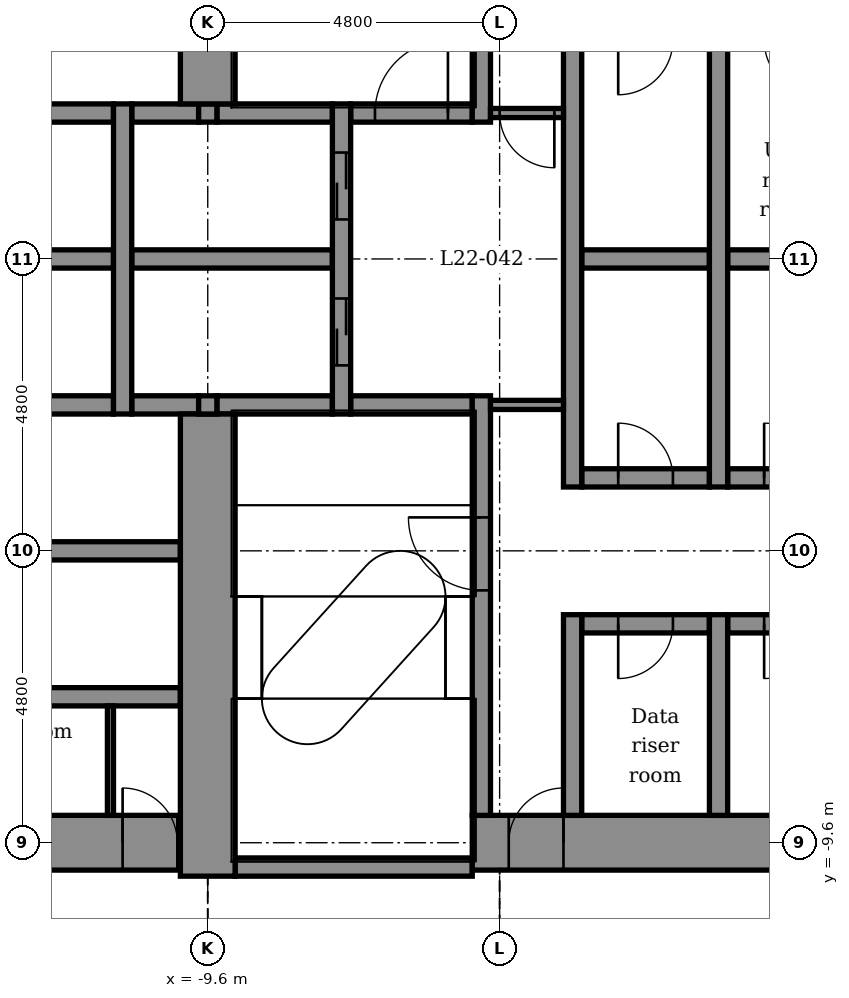
"""IFC4 building model, lengths in metres.
Left out: names, types, materials, properties, quantities, classifications, styles, units other than length and angle.
Written with IfcOpenShell. Run it as: python <this file> out.ifc"""

import sys

from ifc_helpers import new_model, si_unit, direction, frame, frame_2d, origin, place, context, subcontext, project, spatial, rectangle, extrude, element, fill, save


model = new_model("IFC4")
c1 = context("Model", 3, precision=1e-05, world=origin(), true_north=direction((0.0, 1.0)))
c2 = subcontext(c1, "Body", "Model", "MODEL_VIEW")
j1 = project(units=[si_unit("LENGTHUNIT", "METRE"), si_unit("PLANEANGLEUNIT", "RADIAN")], contexts=[c1])
p1 = place(None, origin())
s1 = spatial("IfcSite", under=j1, at=p1, CompositionType="ELEMENT")
p2 = place(p1, origin())
s2 = spatial("IfcBuilding", under=s1, at=p2, CompositionType="ELEMENT")
p3 = place(p2, frame((0.0, 0.0, 113.9)))
s3 = spatial("IfcBuildingStorey", under=s2, at=p3, CompositionType="ELEMENT", Elevation=113.9)
p4 = place(p3, frame((-9.15, -10.0, -0.2), z_axis=(0.0, 0.0, 1.0), x_axis=(1.0, 0.0, 0.0)))
e1 = element("IfcWall", 1, at=p4, inside=s3, PredefinedType="STANDARD", context=c2, shape_type="SweptSolid", body=[
    extrude(rectangle(XDim=3.9, YDim=0.3, at=frame_2d((1.95, 0.0))), origin(), (0.0, 0.0, 1.0), 4.5),
])
p5 = place(p3, frame((-13.95, -9.6, -0.2), z_axis=(0.0, 0.0, 1.0), x_axis=(1.0, 0.0, 0.0)))
e2 = element("IfcWall", 2, at=p5, inside=s3, PredefinedType="SHEAR", context=c2, shape_type="SweptSolid", body=[
    extrude(rectangle(XDim=3.9, YDim=0.9, at=frame_2d((1.95, 0.0))), origin(), (0.0, 0.0, 1.0), 4.5),
])
p6 = place(p5, frame((0.7, 0.0, 0.2)))
e3 = element("IfcOpeningElement", 3, at=p6, cuts=e2, PredefinedType="OPENING", context=c2, shape_type="SweptSolid", body=[
    extrude(rectangle(XDim=0.9, YDim=2.1, at=frame_2d((0.45, 1.05))), frame((0.0, 0.46, 0.0), z_axis=(0.0, -1.0, 0.0), x_axis=(1.0, 0.0, 0.0)), (0.0, 0.0, 1.0), 0.92),
])
p7 = place(p5, frame((2.95, 0.0, 0.2)))
e4 = element("IfcOpeningElement", 4, at=p7, cuts=e2, PredefinedType="OPENING", context=c2, shape_type="SweptSolid", body=[
    extrude(rectangle(XDim=0.9, YDim=2.1, at=frame_2d((0.45, 1.05))), frame((0.0, 0.46, 0.0), z_axis=(0.0, -1.0, 0.0), x_axis=(1.0, 0.0, 0.0)), (0.0, 0.0, 1.0), 0.92),
])
p8 = place(p3, frame((-5.25, -9.6, -0.2), z_axis=(0.0, 0.0, 1.0), x_axis=(1.0, 0.0, 0.0)))
e5 = element("IfcWall", 5, at=p8, inside=s3, PredefinedType="SHEAR", context=c2, shape_type="SweptSolid", body=[
    extrude(rectangle(XDim=10.2, YDim=0.9, at=frame_2d((5.1, 0.0))), origin(), (0.0, 0.0, 1.0), 4.5),
])
p9 = place(p8, frame((0.6, 0.0, 0.2)))
e6 = element("IfcOpeningElement", 6, at=p9, cuts=e5, PredefinedType="OPENING", context=c2, shape_type="SweptSolid", body=[
    extrude(rectangle(XDim=0.9, YDim=2.1, at=frame_2d((0.45, 1.05))), frame((0.0, 0.46, 0.0), z_axis=(0.0, -1.0, 0.0), x_axis=(1.0, 0.0, 0.0)), (0.0, 0.0, 1.0), 0.92),
])
p10 = place(p3, frame((-13.95, -7.2, -0.2), z_axis=(0.0, 0.0, 1.0), x_axis=(1.0, 0.0, 0.0)))
e7 = element("IfcWall", 7, at=p10, inside=s3, PredefinedType="STANDARD", context=c2, shape_type="SweptSolid", body=[
    extrude(rectangle(XDim=3.9, YDim=0.3, at=frame_2d((1.95, 0.0))), origin(), (0.0, 0.0, 1.0), 4.5),
])
p11 = place(p3, frame((-3.45, -6.0, -0.2), z_axis=(0.0, 0.0, 1.0), x_axis=(1.0, 0.0, 0.0)))
e8 = element("IfcWall", 8, at=p11, inside=s3, PredefinedType="STANDARD", context=c2, shape_type="SweptSolid", body=[
    extrude(rectangle(XDim=2.1, YDim=0.3, at=frame_2d((1.05, 0.0))), origin(), (0.0, 0.0, 1.0), 4.5),
])
p12 = place(p11, frame((0.6, 0.0, 0.2)))
e9 = element("IfcOpeningElement", 9, at=p12, cuts=e8, PredefinedType="OPENING", context=c2, shape_type="SweptSolid", body=[
    extrude(rectangle(XDim=0.9, YDim=2.1, at=frame_2d((0.45, 1.05))), frame((0.0, 0.16, 0.0), z_axis=(0.0, -1.0, 0.0), x_axis=(1.0, 0.0, 0.0)), (0.0, 0.0, 1.0), 0.32),
])
p13 = place(p3, frame((-1.05, -6.0, -0.2), z_axis=(0.0, 0.0, 1.0), x_axis=(1.0, 0.0, 0.0)))
e10 = element("IfcWall", 10, at=p13, inside=s3, PredefinedType="STANDARD", context=c2, shape_type="SweptSolid", body=[
    extrude(rectangle(XDim=2.1, YDim=0.3, at=frame_2d((1.05, 0.0))), origin(), (0.0, 0.0, 1.0), 4.5),
])
p14 = place(p13, frame((0.6, 0.0, 0.2)))
e11 = element("IfcOpeningElement", 11, at=p14, cuts=e10, PredefinedType="OPENING", context=c2, shape_type="SweptSolid", body=[
    extrude(rectangle(XDim=0.9, YDim=2.1, at=frame_2d((0.45, 1.05))), frame((0.0, 0.16, 0.0), z_axis=(0.0, -1.0, 0.0), x_axis=(1.0, 0.0, 0.0)), (0.0, 0.0, 1.0), 0.32),
])
p15 = place(p3, frame((-13.95, -4.8, -0.2), z_axis=(0.0, 0.0, 1.0), x_axis=(1.0, 0.0, 0.0)))
e12 = element("IfcWall", 12, at=p15, inside=s3, PredefinedType="STANDARD", context=c2, shape_type="SweptSolid", body=[
    extrude(rectangle(XDim=3.9, YDim=0.3, at=frame_2d((1.95, 0.0))), origin(), (0.0, 0.0, 1.0), 4.5),
])
p16 = place(p3, frame((-3.45, -3.6, -0.2), z_axis=(0.0, 0.0, 1.0), x_axis=(1.0, 0.0, 0.0)))
e13 = element("IfcWall", 13, at=p16, inside=s3, PredefinedType="STANDARD", context=c2, shape_type="SweptSolid", body=[
    extrude(rectangle(XDim=2.1, YDim=0.3, at=frame_2d((1.05, 0.0))), origin(), (0.0, 0.0, 1.0), 4.5),
])
p17 = place(p16, frame((0.6, 0.0, 0.2)))
e14 = element("IfcOpeningElement", 14, at=p17, cuts=e13, PredefinedType="OPENING", context=c2, shape_type="SweptSolid", body=[
    extrude(rectangle(XDim=0.9, YDim=2.1, at=frame_2d((0.45, 1.05))), frame((0.0, 0.16, 0.0), z_axis=(0.0, -1.0, 0.0), x_axis=(1.0, 0.0, 0.0)), (0.0, 0.0, 1.0), 0.32),
])
p18 = place(p3, frame((-1.05, -3.6, -0.2), z_axis=(0.0, 0.0, 1.0), x_axis=(1.0, 0.0, 0.0)))
e15 = element("IfcWall", 15, at=p18, inside=s3, PredefinedType="STANDARD", context=c2, shape_type="SweptSolid", body=[
    extrude(rectangle(XDim=2.1, YDim=0.3, at=frame_2d((1.05, 0.0))), origin(), (0.0, 0.0, 1.0), 4.5),
])
p19 = place(p18, frame((0.6, 0.0, 0.2)))
e16 = element("IfcOpeningElement", 16, at=p19, cuts=e15, PredefinedType="OPENING", context=c2, shape_type="SweptSolid", body=[
    extrude(rectangle(XDim=0.9, YDim=2.1, at=frame_2d((0.45, 1.05))), frame((0.0, 0.16, 0.0), z_axis=(0.0, -1.0, 0.0), x_axis=(1.0, 0.0, 0.0)), (0.0, 0.0, 1.0), 0.32),
])
p20 = place(p3, frame((-13.95, -2.4, -0.2), z_axis=(0.0, 0.0, 1.0), x_axis=(1.0, 0.0, 0.0)))
e17 = element("IfcWall", 17, at=p20, inside=s3, PredefinedType="STANDARD", context=c2, shape_type="SweptSolid", body=[
    extrude(rectangle(XDim=2.8, YDim=0.3, at=frame_2d((1.4, 0.0))), origin(), (0.0, 0.0, 1.0), 4.5),
])
p21 = place(p3, frame((-10.85, -2.4, -0.2), z_axis=(0.0, 0.0, 1.0), x_axis=(1.0, 0.0, 0.0)))
e18 = element("IfcWall", 18, at=p21, inside=s3, PredefinedType="STANDARD", context=c2, shape_type="SweptSolid", body=[
    extrude(rectangle(XDim=1.1, YDim=0.3, at=frame_2d((0.55, 0.0))), origin(), (0.0, 0.0, 1.0), 4.5),
])
p22 = place(p3, frame((-9.45, -2.4, -0.2), z_axis=(0.0, 0.0, 1.0), x_axis=(1.0, 0.0, 0.0)))
e19 = element("IfcWall", 19, at=p22, inside=s3, PredefinedType="STANDARD", context=c2, shape_type="SweptSolid", body=[
    extrude(rectangle(XDim=1.9, YDim=0.3, at=frame_2d((0.95, 0.0))), origin(), (0.0, 0.0, 1.0), 4.5),
])
p23 = place(p3, frame((-7.25, -2.4, -0.2), z_axis=(0.0, 0.0, 1.0), x_axis=(1.0, 0.0, 0.0)))
e20 = element("IfcWall", 20, at=p23, inside=s3, PredefinedType="STANDARD", context=c2, shape_type="SweptSolid", body=[
    extrude(rectangle(XDim=2.0, YDim=0.3, at=frame_2d((1.0, 0.0))), origin(), (0.0, 0.0, 1.0), 4.5),
])
p24 = place(p3, frame((-13.95, 0.0, -0.2), z_axis=(0.0, 0.0, 1.0), x_axis=(1.0, 0.0, 0.0)))
e21 = element("IfcWall", 21, at=p24, inside=s3, PredefinedType="STANDARD", context=c2, shape_type="SweptSolid", body=[
    extrude(rectangle(XDim=2.8, YDim=0.3, at=frame_2d((1.4, 0.0))), origin(), (0.0, 0.0, 1.0), 4.5),
])
p25 = place(p3, frame((-10.85, 0.0, -0.2), z_axis=(0.0, 0.0, 1.0), x_axis=(1.0, 0.0, 0.0)))
e22 = element("IfcWall", 22, at=p25, inside=s3, PredefinedType="STANDARD", context=c2, shape_type="SweptSolid", body=[
    extrude(rectangle(XDim=3.3, YDim=0.3, at=frame_2d((1.65, 0.0))), origin(), (0.0, 0.0, 1.0), 4.5),
])
p26 = place(p3, frame((-3.45, 0.0, -0.2), z_axis=(0.0, 0.0, 1.0), x_axis=(1.0, 0.0, 0.0)))
e23 = element("IfcWall", 23, at=p26, inside=s3, PredefinedType="STANDARD", context=c2, shape_type="SweptSolid", body=[
    extrude(rectangle(XDim=2.1, YDim=0.3, at=frame_2d((1.05, 0.0))), origin(), (0.0, 0.0, 1.0), 4.5),
])
p27 = place(p3, frame((-1.05, 0.0, -0.2), z_axis=(0.0, 0.0, 1.0), x_axis=(1.0, 0.0, 0.0)))
e24 = element("IfcWall", 24, at=p27, inside=s3, PredefinedType="STANDARD", context=c2, shape_type="SweptSolid", body=[
    extrude(rectangle(XDim=2.1, YDim=0.3, at=frame_2d((1.05, 0.0))), origin(), (0.0, 0.0, 1.0), 4.5),
])
p28 = place(p3, frame((-13.95, 2.4, -0.2), z_axis=(0.0, 0.0, 1.0), x_axis=(1.0, 0.0, 0.0)))
e25 = element("IfcWall", 25, at=p28, inside=s3, PredefinedType="STANDARD", context=c2, shape_type="SweptSolid", body=[
    extrude(rectangle(XDim=2.8, YDim=0.3, at=frame_2d((1.4, 0.0))), origin(), (0.0, 0.0, 1.0), 4.5),
])
p29 = place(p3, frame((-10.85, 2.4, -0.2), z_axis=(0.0, 0.0, 1.0), x_axis=(1.0, 0.0, 0.0)))
e26 = element("IfcWall", 26, at=p29, inside=s3, PredefinedType="STANDARD", context=c2, shape_type="SweptSolid", body=[
    extrude(rectangle(XDim=1.1, YDim=0.3, at=frame_2d((0.55, 0.0))), origin(), (0.0, 0.0, 1.0), 4.5),
])
p30 = place(p3, frame((-9.45, 2.4, -0.2), z_axis=(0.0, 0.0, 1.0), x_axis=(1.0, 0.0, 0.0)))
e27 = element("IfcWall", 27, at=p30, inside=s3, PredefinedType="STANDARD", context=c2, shape_type="SweptSolid", body=[
    extrude(rectangle(XDim=1.9, YDim=0.3, at=frame_2d((0.95, 0.0))), origin(), (0.0, 0.0, 1.0), 4.5),
])
p31 = place(p3, frame((-7.25, 2.4, -0.2), z_axis=(0.0, 0.0, 1.0), x_axis=(1.0, 0.0, 0.0)))
e28 = element("IfcWall", 28, at=p31, inside=s3, PredefinedType="STANDARD", context=c2, shape_type="SweptSolid", body=[
    extrude(rectangle(XDim=2.0, YDim=0.3, at=frame_2d((1.0, 0.0))), origin(), (0.0, 0.0, 1.0), 4.5),
])
p32 = place(p31, frame((0.4, 0.0, 0.2)))
e29 = element("IfcOpeningElement", 29, at=p32, cuts=e28, PredefinedType="OPENING", context=c2, shape_type="SweptSolid", body=[
    extrude(rectangle(XDim=1.2, YDim=2.1, at=frame_2d((0.6, 1.05))), frame((0.0, 0.16, 0.0), z_axis=(0.0, -1.0, 0.0), x_axis=(1.0, 0.0, 0.0)), (0.0, 0.0, 1.0), 0.32),
])
p33 = place(p3, frame((-11.0, -2.55, -0.2), z_axis=(0.0, 0.0, 1.0), x_axis=(0.0, 1.0, 0.0)))
e30 = element("IfcWall", 30, at=p33, inside=s3, PredefinedType="STANDARD", context=c2, shape_type="SweptSolid", body=[
    extrude(rectangle(XDim=5.1, YDim=0.3, at=frame_2d((2.55, 0.0))), origin(), (0.0, 0.0, 1.0), 4.5),
])
p34 = place(p3, frame((-9.6, -10.15, -0.2), z_axis=(0.0, 0.0, 1.0), x_axis=(0.0, 1.0, 0.0)))
e31 = element("IfcWall", 31, at=p34, inside=s3, PredefinedType="SHEAR", context=c2, shape_type="SweptSolid", body=[
    extrude(rectangle(XDim=7.6, YDim=0.9, at=frame_2d((3.8, 0.0))), origin(), (0.0, 0.0, 1.0), 4.5),
])
for number, where, z_axis, x_axis in (
    (32, (-9.6, -2.55, -0.2), (0.0, 0.0, 1.0), (0.0, 1.0, 0.0)),
    (33, (-9.6, 2.25, -0.2), (0.0, 0.0, 1.0), (0.0, 1.0, 0.0)),
):
    element("IfcWall", number, at=place(p3, frame(where, z_axis=z_axis, x_axis=x_axis)), inside=s3, PredefinedType="STANDARD", context=c2, shape_type="SweptSolid", body=[
        extrude(rectangle(XDim=0.3, YDim=0.3, at=frame_2d((0.15, 0.0))), origin(), (0.0, 0.0, 1.0), 4.5),
    ])
p35 = place(p3, frame((-9.6, 2.55, -0.2), z_axis=(0.0, 0.0, 1.0), x_axis=(0.0, 1.0, 0.0)))
e34 = element("IfcWall", 34, at=p35, inside=s3, PredefinedType="SHEAR", context=c2, shape_type="SweptSolid", body=[
    extrude(rectangle(XDim=7.6, YDim=0.9, at=frame_2d((3.8, 0.0))), origin(), (0.0, 0.0, 1.0), 4.5),
])
p36 = place(p3, frame((-7.4, -2.55, -0.2), z_axis=(0.0, 0.0, 1.0), x_axis=(0.0, 1.0, 0.0)))
e35 = element("IfcWall", 35, at=p36, inside=s3, PredefinedType="STANDARD", context=c2, shape_type="SweptSolid", body=[
    extrude(rectangle(XDim=5.1, YDim=0.3, at=frame_2d((2.55, 0.0))), origin(), (0.0, 0.0, 1.0), 4.5),
])
p37 = place(p36, frame((0.8, 0.0, 0.2)))
e36 = element("IfcOpeningElement", 36, at=p37, cuts=e35, PredefinedType="OPENING", context=c2, shape_type="SweptSolid", body=[
    extrude(rectangle(XDim=1.1, YDim=2.1, at=frame_2d((0.55, 1.05))), frame((0.0, 0.16, 0.0), z_axis=(0.0, -1.0, 0.0), x_axis=(1.0, 0.0, 0.0)), (0.0, 0.0, 1.0), 0.32),
])
p38 = place(p36, frame((3.2, 0.0, 0.2)))
e37 = element("IfcOpeningElement", 37, at=p38, cuts=e35, PredefinedType="OPENING", context=c2, shape_type="SweptSolid", body=[
    extrude(rectangle(XDim=1.1, YDim=2.1, at=frame_2d((0.55, 1.05))), frame((0.0, 0.16, 0.0), z_axis=(0.0, -1.0, 0.0), x_axis=(1.0, 0.0, 0.0)), (0.0, 0.0, 1.0), 0.32),
])
p39 = place(p3, frame((-5.1, -9.15, -0.2), z_axis=(0.0, 0.0, 1.0), x_axis=(0.0, 1.0, 0.0)))
e38 = element("IfcWall", 38, at=p39, inside=s3, PredefinedType="STANDARD", context=c2, shape_type="SweptSolid", body=[
    extrude(rectangle(XDim=6.9, YDim=0.3, at=frame_2d((3.45, 0.0))), origin(), (0.0, 0.0, 1.0), 4.5),
])
p40 = place(p39, frame((3.7, 0.0, 0.2)))
e39 = element("IfcOpeningElement", 39, at=p40, cuts=e38, PredefinedType="OPENING", context=c2, shape_type="SweptSolid", body=[
    extrude(rectangle(XDim=1.2, YDim=2.1, at=frame_2d((0.6, 1.05))), frame((0.0, 0.16, 0.0), z_axis=(0.0, -1.0, 0.0), x_axis=(1.0, 0.0, 0.0)), (0.0, 0.0, 1.0), 0.32),
])
p41 = place(p3, frame((-5.1, 2.25, -0.2), z_axis=(0.0, 0.0, 1.0), x_axis=(0.0, 1.0, 0.0)))
e40 = element("IfcWall", 40, at=p41, inside=s3, PredefinedType="STANDARD", context=c2, shape_type="SweptSolid", body=[
    extrude(rectangle(XDim=6.9, YDim=0.3, at=frame_2d((3.45, 0.0))), origin(), (0.0, 0.0, 1.0), 4.5),
])
p42 = place(p41, frame((2.0, 0.0, 0.2)))
e41 = element("IfcOpeningElement", 41, at=p42, cuts=e40, PredefinedType="OPENING", context=c2, shape_type="SweptSolid", body=[
    extrude(rectangle(XDim=1.2, YDim=2.1, at=frame_2d((0.6, 1.05))), frame((0.0, 0.16, 0.0), z_axis=(0.0, -1.0, 0.0), x_axis=(1.0, 0.0, 0.0)), (0.0, 0.0, 1.0), 0.32),
])
p43 = place(p3, frame((-3.6, -9.15, -0.2), z_axis=(0.0, 0.0, 1.0), x_axis=(0.0, 1.0, 0.0)))
e42 = element("IfcWall", 42, at=p43, inside=s3, PredefinedType="STANDARD", context=c2, shape_type="SweptSolid", body=[
    extrude(rectangle(XDim=3.3, YDim=0.3, at=frame_2d((1.65, 0.0))), origin(), (0.0, 0.0, 1.0), 4.5),
])
p44 = place(p3, frame((-3.6, -3.75, -0.2), z_axis=(0.0, 0.0, 1.0), x_axis=(0.0, 1.0, 0.0)))
e43 = element("IfcWall", 43, at=p44, inside=s3, PredefinedType="STANDARD", context=c2, shape_type="SweptSolid", body=[
    extrude(rectangle(XDim=7.5, YDim=0.3, at=frame_2d((3.75, 0.0))), origin(), (0.0, 0.0, 1.0), 4.5),
])
p45 = place(p3, frame((-1.2, -9.15, -0.2), z_axis=(0.0, 0.0, 1.0), x_axis=(0.0, 1.0, 0.0)))
e44 = element("IfcWall", 44, at=p45, inside=s3, PredefinedType="STANDARD", context=c2, shape_type="SweptSolid", body=[
    extrude(rectangle(XDim=3.3, YDim=0.3, at=frame_2d((1.65, 0.0))), origin(), (0.0, 0.0, 1.0), 4.5),
])
p46 = place(p3, frame((-1.2, -3.75, -0.2), z_axis=(0.0, 0.0, 1.0), x_axis=(0.0, 1.0, 0.0)))
e45 = element("IfcWall", 45, at=p46, inside=s3, PredefinedType="STANDARD", context=c2, shape_type="SweptSolid", body=[
    extrude(rectangle(XDim=7.5, YDim=0.3, at=frame_2d((3.75, 0.0))), origin(), (0.0, 0.0, 1.0), 4.5),
])
p47 = place(p3, frame((-11.2, -9.15, 0.0), z_axis=(0.0, 0.0, 1.0), x_axis=(0.0, 1.0, 0.0)))
e46 = element("IfcWall", 46, at=p47, inside=s3, PredefinedType="PARTITIONING", context=c2, shape_type="SweptSolid", body=[
    extrude(rectangle(XDim=1.8, YDim=0.1, at=frame_2d((0.9, 0.0))), origin(), (0.0, 0.0, 1.0), 4.3),
])
p48 = place(p3, frame((-4.95, 2.4, 0.0), z_axis=(0.0, 0.0, 1.0), x_axis=(1.0, 0.0, 0.0)))
e47 = element("IfcWall", 47, at=p48, inside=s3, PredefinedType="PARTITIONING", context=c2, shape_type="SweptSolid", body=[
    extrude(rectangle(XDim=1.2, YDim=0.15, at=frame_2d((0.6, 0.0))), origin(), (0.0, 0.0, 1.0), 4.3),
])
p49 = place(p48, frame((0.15, 0.0, 0.0)))
e48 = element("IfcOpeningElement", 48, at=p49, cuts=e47, PredefinedType="OPENING", context=c2, shape_type="SweptSolid", body=[
    extrude(rectangle(XDim=0.9, YDim=2.1, at=frame_2d((0.45, 1.05))), frame((0.0, 0.085, 0.0), z_axis=(0.0, -1.0, 0.0), x_axis=(1.0, 0.0, 0.0)), (0.0, 0.0, 1.0), 0.17),
])
p50 = place(p3, frame((-4.95, -2.4, 0.0), z_axis=(0.0, 0.0, 1.0), x_axis=(1.0, 0.0, 0.0)))
e49 = element("IfcWall", 49, at=p50, inside=s3, PredefinedType="PARTITIONING", context=c2, shape_type="SweptSolid", body=[
    extrude(rectangle(XDim=1.2, YDim=0.15, at=frame_2d((0.6, 0.0))), origin(), (0.0, 0.0, 1.0), 4.3),
])
p51 = place(p37, origin())
e50 = element("IfcDoor", 50, at=p51, inside=s3, OperationType="DOUBLE_DOOR_SLIDING", PredefinedType="DOOR", context=c2, shape_type="SweptSolid", body=[
    extrude(rectangle(XDim=1.1, YDim=2.1, at=frame_2d((0.55, 1.05))), frame((0.0, 0.025, 0.0), z_axis=(0.0, -1.0, 0.0), x_axis=(1.0, 0.0, 0.0)), (0.0, 0.0, 1.0), 0.05),
])
fill(e36, e50)
p52 = place(p38, origin())
e51 = element("IfcDoor", 51, at=p52, inside=s3, OperationType="DOUBLE_DOOR_SLIDING", PredefinedType="DOOR", context=c2, shape_type="SweptSolid", body=[
    extrude(rectangle(XDim=1.1, YDim=2.1, at=frame_2d((0.55, 1.05))), frame((0.0, 0.025, 0.0), z_axis=(0.0, -1.0, 0.0), x_axis=(1.0, 0.0, 0.0)), (0.0, 0.0, 1.0), 0.05),
])
fill(e37, e51)
p53 = place(p40, origin())
e52 = element("IfcDoor", 52, at=p53, inside=s3, OperationType="SINGLE_SWING_RIGHT", PredefinedType="DOOR", context=c2, shape_type="SweptSolid", body=[
    extrude(rectangle(XDim=1.2, YDim=2.1, at=frame_2d((0.6, 1.05))), frame((0.0, 0.025, 0.0), z_axis=(0.0, -1.0, 0.0), x_axis=(1.0, 0.0, 0.0)), (0.0, 0.0, 1.0), 0.05),
])
fill(e39, e52)
p54 = place(p17, origin())
e53 = element("IfcDoor", 53, at=p54, inside=s3, OperationType="SINGLE_SWING_LEFT", PredefinedType="DOOR", context=c2, shape_type="SweptSolid", body=[
    extrude(rectangle(XDim=0.9, YDim=2.1, at=frame_2d((0.45, 1.05))), frame((0.0, 0.025, 0.0), z_axis=(0.0, -1.0, 0.0), x_axis=(1.0, 0.0, 0.0)), (0.0, 0.0, 1.0), 0.05),
])
fill(e14, e53)
p55 = place(p19, origin())
e54 = element("IfcDoor", 54, at=p55, inside=s3, OperationType="SINGLE_SWING_LEFT", PredefinedType="DOOR", context=c2, shape_type="SweptSolid", body=[
    extrude(rectangle(XDim=0.9, YDim=2.1, at=frame_2d((0.45, 1.05))), frame((0.0, 0.025, 0.0), z_axis=(0.0, -1.0, 0.0), x_axis=(1.0, 0.0, 0.0)), (0.0, 0.0, 1.0), 0.05),
])
fill(e16, e54)
p56 = place(p12, frame((0.9, 0.0, 0.0), z_axis=(0.0, 0.0, 1.0), x_axis=(-1.0, 0.0, 0.0)))
e55 = element("IfcDoor", 55, at=p56, inside=s3, OperationType="SINGLE_SWING_LEFT", PredefinedType="DOOR", context=c2, shape_type="SweptSolid", body=[
    extrude(rectangle(XDim=0.9, YDim=2.1, at=frame_2d((0.45, 1.05))), frame((0.0, 0.025, 0.0), z_axis=(0.0, -1.0, 0.0), x_axis=(1.0, 0.0, 0.0)), (0.0, 0.0, 1.0), 0.05),
])
fill(e9, e55)
p57 = place(p14, frame((0.9, 0.0, 0.0), z_axis=(0.0, 0.0, 1.0), x_axis=(-1.0, 0.0, 0.0)))
e56 = element("IfcDoor", 56, at=p57, inside=s3, OperationType="SINGLE_SWING_LEFT", PredefinedType="DOOR", context=c2, shape_type="SweptSolid", body=[
    extrude(rectangle(XDim=0.9, YDim=2.1, at=frame_2d((0.45, 1.05))), frame((0.0, 0.025, 0.0), z_axis=(0.0, -1.0, 0.0), x_axis=(1.0, 0.0, 0.0)), (0.0, 0.0, 1.0), 0.05),
])
fill(e11, e56)
p58 = place(p7, origin())
e57 = element("IfcDoor", 57, at=p58, inside=s3, OperationType="SINGLE_SWING_LEFT", PredefinedType="DOOR", context=c2, shape_type="SweptSolid", body=[
    extrude(rectangle(XDim=0.9, YDim=2.1, at=frame_2d((0.45, 1.05))), frame((0.0, 0.025, 0.0), z_axis=(0.0, -1.0, 0.0), x_axis=(1.0, 0.0, 0.0)), (0.0, 0.0, 1.0), 0.05),
])
fill(e4, e57)
p59 = place(p9, origin())
e58 = element("IfcDoor", 58, at=p59, inside=s3, OperationType="SINGLE_SWING_RIGHT", PredefinedType="DOOR", context=c2, shape_type="SweptSolid", body=[
    extrude(rectangle(XDim=0.9, YDim=2.1, at=frame_2d((0.45, 1.05))), frame((0.0, 0.025, 0.0), z_axis=(0.0, -1.0, 0.0), x_axis=(1.0, 0.0, 0.0)), (0.0, 0.0, 1.0), 0.05),
])
fill(e6, e58)
p60 = place(p49, frame((0.9, 0.0, 0.0), z_axis=(0.0, 0.0, 1.0), x_axis=(-1.0, 0.0, 0.0)))
e59 = element("IfcDoor", 59, at=p60, inside=s3, OperationType="SINGLE_SWING_RIGHT", PredefinedType="DOOR", context=c2, shape_type="SweptSolid", body=[
    extrude(rectangle(XDim=0.9, YDim=2.1, at=frame_2d((0.45, 1.05))), frame((0.0, 0.025, 0.0), z_axis=(0.0, -1.0, 0.0), x_axis=(1.0, 0.0, 0.0)), (0.0, 0.0, 1.0), 0.05),
])
fill(e48, e59)
p61 = place(p32, origin())
e60 = element("IfcDoor", 60, at=p61, inside=s3, OperationType="SINGLE_SWING_RIGHT", PredefinedType="DOOR", context=c2, shape_type="SweptSolid", body=[
    extrude(rectangle(XDim=1.2, YDim=2.1, at=frame_2d((0.6, 1.05))), frame((0.0, 0.025, 0.0), z_axis=(0.0, -1.0, 0.0), x_axis=(1.0, 0.0, 0.0)), (0.0, 0.0, 1.0), 0.05),
])
fill(e29, e60)
save(model, sys.argv[1])
